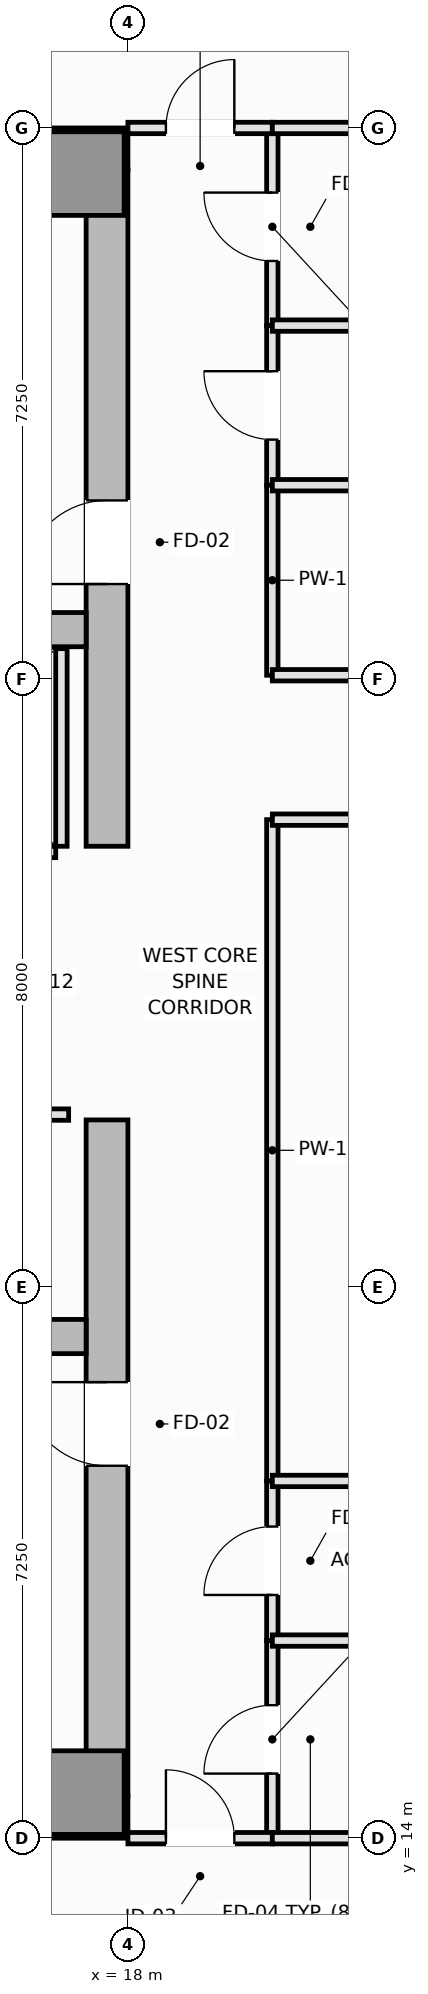
"""IFC4 building model, lengths in metres.
Left out: names, types, materials, properties, quantities, classifications, styles, units other than length and angle.
Written with IfcOpenShell. Run it as: python <this file> out.ifc"""

import sys

from ifc_helpers import new_model, si_unit, direction, frame, frame_2d, origin, origin_2d, place, context, subcontext, project, spatial, rectangle, extrude, element, fill, save


model = new_model("IFC4")
c1 = context("Model", 3, precision=1e-05, world=origin(), true_north=direction((0.0, 1.0)))
c2 = subcontext(c1, "Body", "Model", "MODEL_VIEW")
j1 = project(units=[si_unit("LENGTHUNIT", "METRE"), si_unit("PLANEANGLEUNIT", "RADIAN")], contexts=[c1])
p1 = place(None, origin())
s1 = spatial("IfcSite", under=j1, at=p1, CompositionType="ELEMENT")
p2 = place(p1, origin())
s2 = spatial("IfcBuilding", under=s1, at=p2, CompositionType="ELEMENT")
p3 = place(p2, frame((0.0, 0.0, 202.25)))
s3 = spatial("IfcBuildingStorey", under=s2, at=p3, CompositionType="ELEMENT", Elevation=202.25)
for number, where, z_axis, x_axis in (
    (1, (4.5, 14.275, 0.0), (0.0, 0.0, 1.0), (1.0, 0.0, 0.0)),
    (2, (4.5, 36.225, 0.0), (0.0, 0.0, 1.0), (1.0, 0.0, 0.0)),
):
    element("IfcWall", number, at=place(p3, frame(where, z_axis=z_axis, x_axis=x_axis)), inside=s3, PredefinedType="SHEAR", context=c2, shape_type="SweptSolid", body=[
        extrude(rectangle(XDim=13.5, YDim=0.55, at=frame_2d((6.75, 0.0))), origin(), (0.0, 0.0, 1.0), 3.55),
    ])
p4 = place(p3, frame((17.725, 14.55, 0.0), z_axis=(0.0, 0.0, 1.0), x_axis=(0.0, 1.0, 0.0)))
e3 = element("IfcWall", 3, at=p4, inside=s3, PredefinedType="SHEAR", context=c2, shape_type="SweptSolid", body=[
    extrude(rectangle(XDim=8.9, YDim=0.55, at=frame_2d((4.45, 0.0))), origin(), (0.0, 0.0, 1.0), 3.55),
])
p5 = place(p4, frame((4.35, 0.0, 0.0)))
e4 = element("IfcOpeningElement", 4, at=p5, cuts=e3, PredefinedType="OPENING", context=c2, shape_type="SweptSolid", body=[
    extrude(rectangle(XDim=1.1, YDim=2.15, at=frame_2d((0.55, 1.075))), frame((0.0, 0.285, 0.0), z_axis=(0.0, -1.0, 0.0), x_axis=(1.0, 0.0, 0.0)), (0.0, 0.0, 1.0), 0.57),
])
p6 = place(p3, frame((17.725, 27.05, 0.0), z_axis=(0.0, 0.0, 1.0), x_axis=(0.0, 1.0, 0.0)))
e5 = element("IfcWall", 5, at=p6, inside=s3, PredefinedType="SHEAR", context=c2, shape_type="SweptSolid", body=[
    extrude(rectangle(XDim=8.9, YDim=0.55, at=frame_2d((4.45, 0.0))), origin(), (0.0, 0.0, 1.0), 3.55),
])
p7 = place(p6, frame((3.45, 0.0, 0.0)))
e6 = element("IfcOpeningElement", 6, at=p7, cuts=e5, PredefinedType="OPENING", context=c2, shape_type="SweptSolid", body=[
    extrude(rectangle(XDim=1.1, YDim=2.15, at=frame_2d((0.55, 1.075))), frame((0.0, 0.285, 0.0), z_axis=(0.0, -1.0, 0.0), x_axis=(1.0, 0.0, 0.0)), (0.0, 0.0, 1.0), 0.57),
])
for number, where, z_axis, x_axis in (
    (7, (5.05, 20.6, 0.0), (0.0, 0.0, 1.0), (1.0, 0.0, 0.0)),
    (8, (5.05, 29.9, 0.0), (0.0, 0.0, 1.0), (1.0, 0.0, 0.0)),
):
    element("IfcWall", number, at=place(p3, frame(where, z_axis=z_axis, x_axis=x_axis)), inside=s3, PredefinedType="SHEAR", context=c2, shape_type="SweptSolid", body=[
        extrude(rectangle(XDim=12.4, YDim=0.45, at=frame_2d((6.2, 0.0))), origin(), (0.0, 0.0, 1.0), 3.55),
    ])
for number, where, z_axis, x_axis in (
    (9, (17.4, 14.6, 0.0), (0.0, 0.0, 1.0), (1.0, 0.0, 0.0)),
    (10, (17.4, 35.9, 0.0), (0.0, 0.0, 1.0), (1.0, 0.0, 0.0)),
):
    element("IfcColumn", number, at=place(p3, frame(where, z_axis=z_axis, x_axis=x_axis)), inside=s3, PredefinedType="PILASTER", context=c2, shape_type="SweptSolid", body=[
        extrude(rectangle(XDim=1.1, YDim=1.1, at=origin_2d()), origin(), (0.0, 0.0, 1.0), 3.55),
    ])
p8 = place(p3, frame((14.5, 26.975, 0.0), z_axis=(0.0, 0.0, 1.0), x_axis=(1.0, 0.0, 0.0)))
e11 = element("IfcWall", 11, at=p8, inside=s3, PredefinedType="PARTITIONING", context=c2, shape_type="SweptSolid", body=[
    extrude(rectangle(XDim=2.55, YDim=0.15, at=frame_2d((1.275, 0.0))), origin(), (0.0, 0.0, 1.0), 3.37),
])
p9 = place(p8, frame((0.625, 0.0, 0.0)))
e12 = element("IfcOpeningElement", 12, at=p9, cuts=e11, PredefinedType="OPENING", context=c2, shape_type="SweptSolid", body=[
    extrude(rectangle(XDim=1.3, YDim=2.2, at=frame_2d((0.65, 1.1))), frame((0.0, 0.085, 0.0), z_axis=(0.0, -1.0, 0.0), x_axis=(1.0, 0.0, 0.0)), (0.0, 0.0, 1.0), 0.17),
])
p10 = place(p3, frame((17.125, 27.05, 0.0), z_axis=(0.0, 0.0, 1.0), x_axis=(0.0, 1.0, 0.0)))
e13 = element("IfcWall", 13, at=p10, inside=s3, PredefinedType="PARTITIONING", context=c2, shape_type="SweptSolid", body=[
    extrude(rectangle(XDim=2.6, YDim=0.15, at=frame_2d((1.3, 0.0))), origin(), (0.0, 0.0, 1.0), 3.37),
])
p11 = place(p3, frame((14.33, 23.52, 0.0), z_axis=(0.0, 0.0, 1.0), x_axis=(1.0, 0.0, 0.0)))
e14 = element("IfcWall", 14, at=p11, inside=s3, PredefinedType="PARTITIONING", context=c2, shape_type="SweptSolid", body=[
    extrude(rectangle(XDim=2.89, YDim=0.15, at=frame_2d((1.445, 0.0))), origin(), (0.0, 0.0, 1.0), 3.37),
])
p12 = place(p11, frame((0.28, 0.0, 0.0)))
e15 = element("IfcOpeningElement", 15, at=p12, cuts=e14, PredefinedType="OPENING", context=c2, shape_type="SweptSolid", body=[
    extrude(rectangle(XDim=0.9, YDim=2.1, at=frame_2d((0.45, 1.05))), frame((0.0, 0.085, 0.0), z_axis=(0.0, -1.0, 0.0), x_axis=(1.0, 0.0, 0.0)), (0.0, 0.0, 1.0), 0.17),
])
p13 = place(p11, frame((1.71, 0.0, 0.0)))
e16 = element("IfcOpeningElement", 16, at=p13, cuts=e14, PredefinedType="OPENING", context=c2, shape_type="SweptSolid", body=[
    extrude(rectangle(XDim=0.9, YDim=2.1, at=frame_2d((0.45, 1.05))), frame((0.0, 0.085, 0.0), z_axis=(0.0, -1.0, 0.0), x_axis=(1.0, 0.0, 0.0)), (0.0, 0.0, 1.0), 0.17),
])
p14 = place(p3, frame((19.9, 14.0, 0.0), z_axis=(0.0, 0.0, 1.0), x_axis=(0.0, 1.0, 0.0)))
e17 = element("IfcWall", 17, at=p14, inside=s3, PredefinedType="PLUMBINGWALL", context=c2, shape_type="SweptSolid", body=[
    extrude(rectangle(XDim=2.6, YDim=0.15, at=frame_2d((1.3, 0.0))), origin(), (0.0, 0.0, 1.0), 3.37),
])
p15 = place(p14, frame((0.85, 0.0, 0.0)))
e18 = element("IfcOpeningElement", 18, at=p15, cuts=e17, PredefinedType="OPENING", context=c2, shape_type="SweptSolid", body=[
    extrude(rectangle(XDim=0.9, YDim=2.1, at=frame_2d((0.45, 1.05))), frame((0.0, 0.085, 0.0), z_axis=(0.0, -1.0, 0.0), x_axis=(1.0, 0.0, 0.0)), (0.0, 0.0, 1.0), 0.17),
])
p16 = place(p3, frame((19.9, 33.9, 0.0), z_axis=(0.0, 0.0, 1.0), x_axis=(0.0, 1.0, 0.0)))
e19 = element("IfcWall", 19, at=p16, inside=s3, PredefinedType="PLUMBINGWALL", context=c2, shape_type="SweptSolid", body=[
    extrude(rectangle(XDim=2.6, YDim=0.15, at=frame_2d((1.3, 0.0))), origin(), (0.0, 0.0, 1.0), 3.37),
])
p17 = place(p16, frame((0.85, 0.0, 0.0)))
e20 = element("IfcOpeningElement", 20, at=p17, cuts=e19, PredefinedType="OPENING", context=c2, shape_type="SweptSolid", body=[
    extrude(rectangle(XDim=0.9, YDim=2.1, at=frame_2d((0.45, 1.05))), frame((0.0, 0.085, 0.0), z_axis=(0.0, -1.0, 0.0), x_axis=(1.0, 0.0, 0.0)), (0.0, 0.0, 1.0), 0.17),
])
p18 = place(p3, frame((19.9, 16.6, 0.0), z_axis=(0.0, 0.0, 1.0), x_axis=(0.0, 1.0, 0.0)))
e21 = element("IfcWall", 21, at=p18, inside=s3, PredefinedType="PLUMBINGWALL", context=c2, shape_type="SweptSolid", body=[
    extrude(rectangle(XDim=2.1, YDim=0.15, at=frame_2d((1.05, 0.0))), origin(), (0.0, 0.0, 1.0), 3.37),
])
p19 = place(p18, frame((0.6, 0.0, 0.0)))
e22 = element("IfcOpeningElement", 22, at=p19, cuts=e21, PredefinedType="OPENING", context=c2, shape_type="SweptSolid", body=[
    extrude(rectangle(XDim=0.9, YDim=2.1, at=frame_2d((0.45, 1.05))), frame((0.0, 0.085, 0.0), z_axis=(0.0, -1.0, 0.0), x_axis=(1.0, 0.0, 0.0)), (0.0, 0.0, 1.0), 0.17),
])
p20 = place(p3, frame((19.9, 31.8, 0.0), z_axis=(0.0, 0.0, 1.0), x_axis=(0.0, 1.0, 0.0)))
e23 = element("IfcWall", 23, at=p20, inside=s3, PredefinedType="PLUMBINGWALL", context=c2, shape_type="SweptSolid", body=[
    extrude(rectangle(XDim=2.1, YDim=0.15, at=frame_2d((1.05, 0.0))), origin(), (0.0, 0.0, 1.0), 3.37),
])
p21 = place(p20, frame((0.6, 0.0, 0.0)))
e24 = element("IfcOpeningElement", 24, at=p21, cuts=e23, PredefinedType="OPENING", context=c2, shape_type="SweptSolid", body=[
    extrude(rectangle(XDim=0.9, YDim=2.1, at=frame_2d((0.45, 1.05))), frame((0.0, 0.085, 0.0), z_axis=(0.0, -1.0, 0.0), x_axis=(1.0, 0.0, 0.0)), (0.0, 0.0, 1.0), 0.17),
])
p22 = place(p3, frame((19.9, 18.7, 0.0), z_axis=(0.0, 0.0, 1.0), x_axis=(0.0, 1.0, 0.0)))
e25 = element("IfcWall", 25, at=p22, inside=s3, PredefinedType="PARTITIONING", context=c2, shape_type="SweptSolid", body=[
    extrude(rectangle(XDim=8.7, YDim=0.15, at=frame_2d((4.35, 0.0))), origin(), (0.0, 0.0, 1.0), 3.37),
])
p23 = place(p3, frame((19.9, 29.3, 0.0), z_axis=(0.0, 0.0, 1.0), x_axis=(0.0, 1.0, 0.0)))
e26 = element("IfcWall", 26, at=p23, inside=s3, PredefinedType="PARTITIONING", context=c2, shape_type="SweptSolid", body=[
    extrude(rectangle(XDim=2.5, YDim=0.15, at=frame_2d((1.25, 0.0))), origin(), (0.0, 0.0, 1.0), 3.37),
])
p24 = place(p3, frame((18.0, 14.0, 0.0), z_axis=(0.0, 0.0, 1.0), x_axis=(1.0, 0.0, 0.0)))
e27 = element("IfcWall", 27, at=p24, inside=s3, PredefinedType="PARTITIONING", context=c2, shape_type="SweptSolid", body=[
    extrude(rectangle(XDim=1.9, YDim=0.15, at=frame_2d((0.95, 0.0))), origin(), (0.0, 0.0, 1.0), 3.37),
])
p25 = place(p24, frame((0.5, 0.0, 0.0)))
e28 = element("IfcOpeningElement", 28, at=p25, cuts=e27, PredefinedType="OPENING", context=c2, shape_type="SweptSolid", body=[
    extrude(rectangle(XDim=0.9, YDim=2.1, at=frame_2d((0.45, 1.05))), frame((0.0, 0.085, 0.0), z_axis=(0.0, -1.0, 0.0), x_axis=(1.0, 0.0, 0.0)), (0.0, 0.0, 1.0), 0.17),
])
p26 = place(p3, frame((18.0, 36.5, 0.0), z_axis=(0.0, 0.0, 1.0), x_axis=(1.0, 0.0, 0.0)))
e29 = element("IfcWall", 29, at=p26, inside=s3, PredefinedType="PARTITIONING", context=c2, shape_type="SweptSolid", body=[
    extrude(rectangle(XDim=1.9, YDim=0.15, at=frame_2d((0.95, 0.0))), origin(), (0.0, 0.0, 1.0), 3.37),
])
p27 = place(p26, frame((0.5, 0.0, 0.0)))
e30 = element("IfcOpeningElement", 30, at=p27, cuts=e29, PredefinedType="OPENING", context=c2, shape_type="SweptSolid", body=[
    extrude(rectangle(XDim=0.9, YDim=2.1, at=frame_2d((0.45, 1.05))), frame((0.0, 0.085, 0.0), z_axis=(0.0, -1.0, 0.0), x_axis=(1.0, 0.0, 0.0)), (0.0, 0.0, 1.0), 0.17),
])
p28 = place(p3, frame((19.9, 27.4, 0.0), z_axis=(0.0, 0.0, 1.0), x_axis=(1.0, 0.0, 0.0)))
e31 = element("IfcWall", 31, at=p28, inside=s3, PredefinedType="PARTITIONING", context=c2, shape_type="SweptSolid", body=[
    extrude(rectangle(XDim=16.4, YDim=0.15, at=frame_2d((8.2, 0.0))), origin(), (0.0, 0.0, 1.0), 3.37),
])
p29 = place(p28, frame((7.7, 0.0, 0.0)))
e32 = element("IfcOpeningElement", 32, at=p29, cuts=e31, PredefinedType="OPENING", context=c2, shape_type="SweptSolid", body=[
    extrude(rectangle(XDim=1.0, YDim=2.15, at=frame_2d((0.5, 1.075))), frame((0.0, 0.085, 0.0), z_axis=(0.0, -1.0, 0.0), x_axis=(1.0, 0.0, 0.0)), (0.0, 0.0, 1.0), 0.17),
])
p30 = place(p3, frame((19.9, 29.3, 0.0), z_axis=(0.0, 0.0, 1.0), x_axis=(1.0, 0.0, 0.0)))
e33 = element("IfcWall", 33, at=p30, inside=s3, PredefinedType="PARTITIONING", context=c2, shape_type="SweptSolid", body=[
    extrude(rectangle(XDim=16.4, YDim=0.15, at=frame_2d((8.2, 0.0))), origin(), (0.0, 0.0, 1.0), 3.37),
])
p31 = place(p30, frame((7.7, 0.0, 0.0)))
e34 = element("IfcOpeningElement", 34, at=p31, cuts=e33, PredefinedType="OPENING", context=c2, shape_type="SweptSolid", body=[
    extrude(rectangle(XDim=1.0, YDim=2.15, at=frame_2d((0.5, 1.075))), frame((0.0, 0.085, 0.0), z_axis=(0.0, -1.0, 0.0), x_axis=(1.0, 0.0, 0.0)), (0.0, 0.0, 1.0), 0.17),
])
for number, where, z_axis, x_axis in (
    (35, (19.9, 16.6, 0.0), (0.0, 0.0, 1.0), (1.0, 0.0, 0.0)),
    (36, (19.9, 14.0, 0.0), (0.0, 0.0, 1.0), (1.0, 0.0, 0.0)),
    (37, (19.9, 33.9, 0.0), (0.0, 0.0, 1.0), (1.0, 0.0, 0.0)),
    (38, (19.9, 36.5, 0.0), (0.0, 0.0, 1.0), (1.0, 0.0, 0.0)),
    (39, (19.9, 18.7, 0.0), (0.0, 0.0, 1.0), (1.0, 0.0, 0.0)),
    (40, (19.9, 31.8, 0.0), (0.0, 0.0, 1.0), (1.0, 0.0, 0.0)),
):
    element("IfcWall", number, at=place(p3, frame(where, z_axis=z_axis, x_axis=x_axis)), inside=s3, PredefinedType="PLUMBINGWALL", context=c2, shape_type="SweptSolid", body=[
        extrude(rectangle(XDim=3.6, YDim=0.15, at=frame_2d((1.8, 0.0))), origin(), (0.0, 0.0, 1.0), 3.37),
    ])
p32 = place(p5, origin())
e41 = element("IfcDoor", 41, at=p32, inside=s3, OperationType="SINGLE_SWING_RIGHT", PredefinedType="DOOR", context=c2, shape_type="SweptSolid", body=[
    extrude(rectangle(XDim=1.1, YDim=2.15, at=frame_2d((0.55, 1.075))), frame((0.0, 0.025, 0.0), z_axis=(0.0, -1.0, 0.0), x_axis=(1.0, 0.0, 0.0)), (0.0, 0.0, 1.0), 0.05),
])
fill(e4, e41)
p33 = place(p7, origin())
e42 = element("IfcDoor", 42, at=p33, inside=s3, OperationType="SINGLE_SWING_LEFT", PredefinedType="DOOR", context=c2, shape_type="SweptSolid", body=[
    extrude(rectangle(XDim=1.1, YDim=2.15, at=frame_2d((0.55, 1.075))), frame((0.0, 0.025, 0.0), z_axis=(0.0, -1.0, 0.0), x_axis=(1.0, 0.0, 0.0)), (0.0, 0.0, 1.0), 0.05),
])
fill(e6, e42)
p34 = place(p15, origin())
e43 = element("IfcDoor", 43, at=p34, inside=s3, OperationType="SINGLE_SWING_LEFT", PredefinedType="DOOR", context=c2, shape_type="SweptSolid", body=[
    extrude(rectangle(XDim=0.9, YDim=2.1, at=frame_2d((0.45, 1.05))), frame((0.0, 0.025, 0.0), z_axis=(0.0, -1.0, 0.0), x_axis=(1.0, 0.0, 0.0)), (0.0, 0.0, 1.0), 0.05),
])
fill(e18, e43)
p35 = place(p17, origin())
e44 = element("IfcDoor", 44, at=p35, inside=s3, OperationType="SINGLE_SWING_RIGHT", PredefinedType="DOOR", context=c2, shape_type="SweptSolid", body=[
    extrude(rectangle(XDim=0.9, YDim=2.1, at=frame_2d((0.45, 1.05))), frame((0.0, 0.025, 0.0), z_axis=(0.0, -1.0, 0.0), x_axis=(1.0, 0.0, 0.0)), (0.0, 0.0, 1.0), 0.05),
])
fill(e20, e44)
p36 = place(p19, origin())
e45 = element("IfcDoor", 45, at=p36, inside=s3, OperationType="SINGLE_SWING_LEFT", PredefinedType="DOOR", context=c2, shape_type="SweptSolid", body=[
    extrude(rectangle(XDim=0.9, YDim=2.1, at=frame_2d((0.45, 1.05))), frame((0.0, 0.025, 0.0), z_axis=(0.0, -1.0, 0.0), x_axis=(1.0, 0.0, 0.0)), (0.0, 0.0, 1.0), 0.05),
])
fill(e22, e45)
p37 = place(p21, origin())
e46 = element("IfcDoor", 46, at=p37, inside=s3, OperationType="SINGLE_SWING_RIGHT", PredefinedType="DOOR", context=c2, shape_type="SweptSolid", body=[
    extrude(rectangle(XDim=0.9, YDim=2.1, at=frame_2d((0.45, 1.05))), frame((0.0, 0.025, 0.0), z_axis=(0.0, -1.0, 0.0), x_axis=(1.0, 0.0, 0.0)), (0.0, 0.0, 1.0), 0.05),
])
fill(e24, e46)
p38 = place(p25, origin())
e47 = element("IfcDoor", 47, at=p38, inside=s3, OperationType="SINGLE_SWING_LEFT", PredefinedType="DOOR", context=c2, shape_type="SweptSolid", body=[
    extrude(rectangle(XDim=0.9, YDim=2.1, at=frame_2d((0.45, 1.05))), frame((0.0, 0.025, 0.0), z_axis=(0.0, -1.0, 0.0), x_axis=(1.0, 0.0, 0.0)), (0.0, 0.0, 1.0), 0.05),
])
fill(e28, e47)
p39 = place(p27, origin())
e48 = element("IfcDoor", 48, at=p39, inside=s3, OperationType="SINGLE_SWING_RIGHT", PredefinedType="DOOR", context=c2, shape_type="SweptSolid", body=[
    extrude(rectangle(XDim=0.9, YDim=2.1, at=frame_2d((0.45, 1.05))), frame((0.0, 0.025, 0.0), z_axis=(0.0, -1.0, 0.0), x_axis=(1.0, 0.0, 0.0)), (0.0, 0.0, 1.0), 0.05),
])
fill(e30, e48)
save(model, sys.argv[1])
